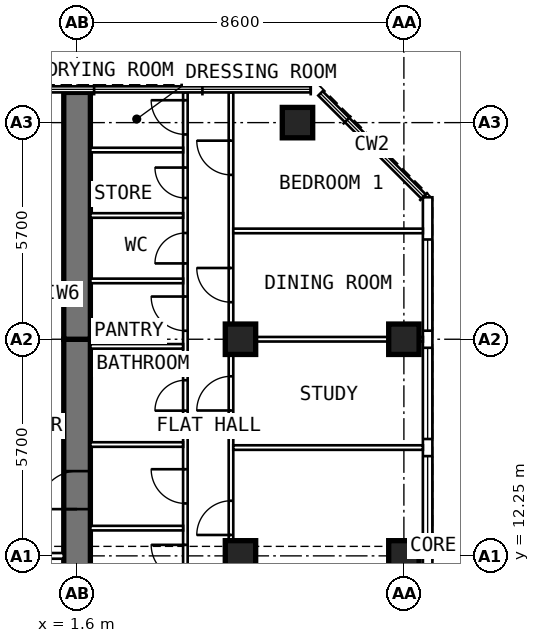
"""IFC4 building model, lengths in metres.
Left out: names, types, materials, properties, quantities, classifications, styles, units other than length and angle.
Written with IfcOpenShell. Run it as: python <this file> out.ifc"""

import sys

from ifc_helpers import new_model, si_unit, direction, frame, frame_2d, origin, origin_2d, place, context, subcontext, project, spatial, rectangle, extrude, element, fill, save


model = new_model("IFC4")
c1 = context("Model", 3, precision=1e-05, world=origin(), true_north=direction((0.0, 1.0)))
c2 = subcontext(c1, "Body", "Model", "MODEL_VIEW")
j1 = project(units=[si_unit("LENGTHUNIT", "METRE"), si_unit("PLANEANGLEUNIT", "RADIAN")], contexts=[c1])
p1 = place(None, origin())
s1 = spatial("IfcSite", under=j1, at=p1, CompositionType="ELEMENT")
p2 = place(p1, origin())
s2 = spatial("IfcBuilding", under=s1, at=p2, CompositionType="ELEMENT")
p3 = place(p2, frame((0.0, 0.0, 267.4)))
s3 = spatial("IfcBuildingStorey", under=s2, at=p3, CompositionType="ELEMENT", Elevation=267.4)
for number, where, z_axis, x_axis in (
    (1, (10.2, 12.25, 0.0), (0.0, 0.0, 1.0), (0.0, 1.0, 0.0)),
    (2, (10.2, 17.95, 0.0), (0.0, 0.0, 1.0), (0.0, 1.0, 0.0)),
    (3, (7.4, 23.65, 0.0), (0.0, 0.0, 1.0), (0.0, 1.0, 0.0)),
    (4, (5.9, 12.25, 0.0), (0.0, 0.0, 1.0), (0.0, 1.0, 0.0)),
    (5, (5.9, 17.95, 0.0), (0.0, 0.0, 1.0), (0.0, 1.0, 0.0)),
):
    element("IfcColumn", number, at=place(p3, frame(where, z_axis=z_axis, x_axis=x_axis)), inside=s3, PredefinedType="COLUMN", context=c2, shape_type="SweptSolid", body=[
        extrude(rectangle(XDim=0.8, YDim=0.8, at=origin_2d()), origin(), (0.0, 0.0, 1.0), 3.6),
    ])
p4 = place(p3, frame((1.6, 9.6, 0.0), z_axis=(0.0, 0.0, 1.0), x_axis=(0.0, 1.0, 0.0)))
e6 = element("IfcWall", 6, at=p4, inside=s3, PredefinedType="SHEAR", context=c2, shape_type="SweptSolid", body=[
    extrude(rectangle(XDim=8.35, YDim=0.7, at=frame_2d((4.175, 0.0))), origin(), (0.0, 0.0, 1.0), 3.6),
])
p5 = place(p4, frame((3.88, 0.0, 0.0)))
e7 = element("IfcOpeningElement", 7, at=p5, cuts=e6, PredefinedType="OPENING", context=c2, shape_type="SweptSolid", body=[
    extrude(rectangle(XDim=1.0, YDim=2.1, at=frame_2d((0.5, 1.05))), frame((0.0, 0.362, 0.0), z_axis=(0.0, -1.0, 0.0), x_axis=(1.0, 0.0, 0.0)), (0.0, 0.0, 1.0), 0.724),
])
p6 = place(p3, frame((1.6, 17.95, 0.0), z_axis=(0.0, 0.0, 1.0), x_axis=(0.0, 1.0, 0.0)))
e8 = element("IfcWall", 8, at=p6, inside=s3, PredefinedType="SHEAR", context=c2, shape_type="SweptSolid", body=[
    extrude(rectangle(XDim=6.495, YDim=0.7, at=frame_2d((3.248, 0.0))), origin(), (0.0, 0.0, 1.0), 3.6),
])
p7 = place(p3, frame((10.825, 6.409, 0.0), z_axis=(0.0, 0.0, 1.0), x_axis=(0.0, 1.0, 0.0)))
e9 = element("IfcWall", 9, at=p7, inside=s3, PredefinedType="SOLIDWALL", context=c2, shape_type="SweptSolid", body=[
    extrude(rectangle(XDim=15.276, YDim=0.25, at=frame_2d((7.638, 0.0))), origin(), (0.0, 0.0, 1.0), 3.35),
])
p8 = place(p7, frame((0.366, 0.0, 0.6)))
e10 = element("IfcOpeningElement", 10, at=p8, cuts=e9, PredefinedType="OPENING", context=c2, shape_type="SweptSolid", body=[
    extrude(rectangle(XDim=2.4, YDim=2.0, at=frame_2d((1.2, 1.0))), frame((0.0, 0.137, 0.0), z_axis=(0.0, -1.0, 0.0), x_axis=(1.0, 0.0, 0.0)), (0.0, 0.0, 1.0), 0.274),
])
p9 = place(p7, frame((3.216, 0.0, 0.6)))
e11 = element("IfcOpeningElement", 11, at=p9, cuts=e9, PredefinedType="OPENING", context=c2, shape_type="SweptSolid", body=[
    extrude(rectangle(XDim=2.4, YDim=2.0, at=frame_2d((1.2, 1.0))), frame((0.0, 0.137, 0.0), z_axis=(0.0, -1.0, 0.0), x_axis=(1.0, 0.0, 0.0)), (0.0, 0.0, 1.0), 0.274),
])
p10 = place(p7, frame((6.066, 0.0, 0.6)))
e12 = element("IfcOpeningElement", 12, at=p10, cuts=e9, PredefinedType="OPENING", context=c2, shape_type="SweptSolid", body=[
    extrude(rectangle(XDim=2.4, YDim=2.0, at=frame_2d((1.2, 1.0))), frame((0.0, 0.137, 0.0), z_axis=(0.0, -1.0, 0.0), x_axis=(1.0, 0.0, 0.0)), (0.0, 0.0, 1.0), 0.274),
])
p11 = place(p7, frame((8.916, 0.0, 0.6)))
e13 = element("IfcOpeningElement", 13, at=p11, cuts=e9, PredefinedType="OPENING", context=c2, shape_type="SweptSolid", body=[
    extrude(rectangle(XDim=2.4, YDim=2.0, at=frame_2d((1.2, 1.0))), frame((0.0, 0.137, 0.0), z_axis=(0.0, -1.0, 0.0), x_axis=(1.0, 0.0, 0.0)), (0.0, 0.0, 1.0), 0.274),
])
p12 = place(p7, frame((11.766, 0.0, 0.6)))
e14 = element("IfcOpeningElement", 14, at=p12, cuts=e9, PredefinedType="OPENING", context=c2, shape_type="SweptSolid", body=[
    extrude(rectangle(XDim=2.4, YDim=2.0, at=frame_2d((1.2, 1.0))), frame((0.0, 0.137, 0.0), z_axis=(0.0, -1.0, 0.0), x_axis=(1.0, 0.0, 0.0)), (0.0, 0.0, 1.0), 0.274),
])
p13 = place(p3, frame((4.45, 9.875, 0.0), z_axis=(0.0, 0.0, 1.0), x_axis=(0.0, 1.0, 0.0)))
e15 = element("IfcWall", 15, at=p13, inside=s3, PredefinedType="PARTITIONING", context=c2, shape_type="SweptSolid", body=[
    extrude(rectangle(XDim=14.57, YDim=0.12, at=frame_2d((7.285, 0.0))), origin(), (0.0, 0.0, 1.0), 3.35),
])
p14 = place(p13, frame((1.765, 0.0, 0.0)))
e16 = element("IfcOpeningElement", 16, at=p14, cuts=e15, PredefinedType="OPENING", context=c2, shape_type="SweptSolid", body=[
    extrude(rectangle(XDim=0.9, YDim=2.1, at=frame_2d((0.45, 1.05))), frame((0.0, 0.072, 0.0), z_axis=(0.0, -1.0, 0.0), x_axis=(1.0, 0.0, 0.0)), (0.0, 0.0, 1.0), 0.144),
])
p15 = place(p13, frame((3.755, 0.0, 0.0)))
e17 = element("IfcOpeningElement", 17, at=p15, cuts=e15, PredefinedType="OPENING", context=c2, shape_type="SweptSolid", body=[
    extrude(rectangle(XDim=0.9, YDim=2.1, at=frame_2d((0.45, 1.05))), frame((0.0, 0.072, 0.0), z_axis=(0.0, -1.0, 0.0), x_axis=(1.0, 0.0, 0.0)), (0.0, 0.0, 1.0), 0.144),
])
p16 = place(p13, frame((6.196, 0.0, 0.0)))
e18 = element("IfcOpeningElement", 18, at=p16, cuts=e15, PredefinedType="OPENING", context=c2, shape_type="SweptSolid", body=[
    extrude(rectangle(XDim=0.8, YDim=2.1, at=frame_2d((0.4, 1.05))), frame((0.0, 0.072, 0.0), z_axis=(0.0, -1.0, 0.0), x_axis=(1.0, 0.0, 0.0)), (0.0, 0.0, 1.0), 0.144),
])
p17 = place(p13, frame((8.299, 0.0, 0.0)))
e19 = element("IfcOpeningElement", 19, at=p17, cuts=e15, PredefinedType="OPENING", context=c2, shape_type="SweptSolid", body=[
    extrude(rectangle(XDim=0.9, YDim=2.1, at=frame_2d((0.45, 1.05))), frame((0.0, 0.072, 0.0), z_axis=(0.0, -1.0, 0.0), x_axis=(1.0, 0.0, 0.0)), (0.0, 0.0, 1.0), 0.144),
])
p18 = place(p13, frame((10.071, 0.0, 0.0)))
e20 = element("IfcOpeningElement", 20, at=p18, cuts=e15, PredefinedType="OPENING", context=c2, shape_type="SweptSolid", body=[
    extrude(rectangle(XDim=0.8, YDim=2.1, at=frame_2d((0.4, 1.05))), frame((0.0, 0.072, 0.0), z_axis=(0.0, -1.0, 0.0), x_axis=(1.0, 0.0, 0.0)), (0.0, 0.0, 1.0), 0.144),
])
p19 = place(p13, frame((11.792, 0.0, 0.0)))
e21 = element("IfcOpeningElement", 21, at=p19, cuts=e15, PredefinedType="OPENING", context=c2, shape_type="SweptSolid", body=[
    extrude(rectangle(XDim=0.8, YDim=2.1, at=frame_2d((0.4, 1.05))), frame((0.0, 0.072, 0.0), z_axis=(0.0, -1.0, 0.0), x_axis=(1.0, 0.0, 0.0)), (0.0, 0.0, 1.0), 0.144),
])
p20 = place(p13, frame((13.464, 0.0, 0.0)))
e22 = element("IfcOpeningElement", 22, at=p20, cuts=e15, PredefinedType="OPENING", context=c2, shape_type="SweptSolid", body=[
    extrude(rectangle(XDim=0.9, YDim=2.1, at=frame_2d((0.45, 1.05))), frame((0.0, 0.072, 0.0), z_axis=(0.0, -1.0, 0.0), x_axis=(1.0, 0.0, 0.0)), (0.0, 0.0, 1.0), 0.144),
])
p21 = place(p3, frame((5.65, 9.6, 0.0), z_axis=(0.0, 0.0, 1.0), x_axis=(0.0, 1.0, 0.0)))
e23 = element("IfcWall", 23, at=p21, inside=s3, PredefinedType="PARTITIONING", context=c2, shape_type="SweptSolid", body=[
    extrude(rectangle(XDim=14.845, YDim=0.12, at=frame_2d((7.422, 0.0))), origin(), (0.0, 0.0, 1.0), 3.35),
])
p22 = place(p21, frame((3.2, 0.0, 0.0)))
e24 = element("IfcOpeningElement", 24, at=p22, cuts=e23, PredefinedType="OPENING", context=c2, shape_type="SweptSolid", body=[
    extrude(rectangle(XDim=0.9, YDim=2.1, at=frame_2d((0.45, 1.05))), frame((0.0, 0.072, 0.0), z_axis=(0.0, -1.0, 0.0), x_axis=(1.0, 0.0, 0.0)), (0.0, 0.0, 1.0), 0.144),
])
p23 = place(p21, frame((6.475, 0.0, 0.0)))
e25 = element("IfcOpeningElement", 25, at=p23, cuts=e23, PredefinedType="OPENING", context=c2, shape_type="SweptSolid", body=[
    extrude(rectangle(XDim=0.9, YDim=2.1, at=frame_2d((0.45, 1.05))), frame((0.0, 0.072, 0.0), z_axis=(0.0, -1.0, 0.0), x_axis=(1.0, 0.0, 0.0)), (0.0, 0.0, 1.0), 0.144),
])
p24 = place(p21, frame((9.325, 0.0, 0.0)))
e26 = element("IfcOpeningElement", 26, at=p24, cuts=e23, PredefinedType="OPENING", context=c2, shape_type="SweptSolid", body=[
    extrude(rectangle(XDim=0.9, YDim=2.1, at=frame_2d((0.45, 1.05))), frame((0.0, 0.072, 0.0), z_axis=(0.0, -1.0, 0.0), x_axis=(1.0, 0.0, 0.0)), (0.0, 0.0, 1.0), 0.144),
])
p25 = place(p21, frame((12.675, 0.0, 0.0)))
e27 = element("IfcOpeningElement", 27, at=p25, cuts=e23, PredefinedType="OPENING", context=c2, shape_type="SweptSolid", body=[
    extrude(rectangle(XDim=0.9, YDim=2.1, at=frame_2d((0.45, 1.05))), frame((0.0, 0.072, 0.0), z_axis=(0.0, -1.0, 0.0), x_axis=(1.0, 0.0, 0.0)), (0.0, 0.0, 1.0), 0.144),
])
p26 = place(p3, frame((5.71, 15.1, 0.0), z_axis=(0.0, 0.0, 1.0), x_axis=(1.0, 0.0, 0.0)))
e28 = element("IfcWall", 28, at=p26, inside=s3, PredefinedType="PARTITIONING", context=c2, shape_type="SweptSolid", body=[
    extrude(rectangle(XDim=4.99, YDim=0.12, at=frame_2d((2.495, 0.0))), origin(), (0.0, 0.0, 1.0), 3.35),
])
p27 = place(p3, frame((5.71, 17.95, 0.0), z_axis=(0.0, 0.0, 1.0), x_axis=(1.0, 0.0, 0.0)))
e29 = element("IfcWall", 29, at=p27, inside=s3, PredefinedType="PARTITIONING", context=c2, shape_type="SweptSolid", body=[
    extrude(rectangle(XDim=4.99, YDim=0.12, at=frame_2d((2.495, 0.0))), origin(), (0.0, 0.0, 1.0), 2.45),
])
p28 = place(p3, frame((5.71, 20.8, 0.0), z_axis=(0.0, 0.0, 1.0), x_axis=(1.0, 0.0, 0.0)))
e30 = element("IfcWall", 30, at=p28, inside=s3, PredefinedType="PARTITIONING", context=c2, shape_type="SweptSolid", body=[
    extrude(rectangle(XDim=4.99, YDim=0.12, at=frame_2d((2.495, 0.0))), origin(), (0.0, 0.0, 1.0), 3.35),
])
for number, where, z_axis, x_axis in (
    (31, (1.95, 12.98, 0.0), (0.0, 0.0, 1.0), (1.0, 0.0, 0.0)),
    (32, (1.95, 15.18, 0.0), (0.0, 0.0, 1.0), (1.0, 0.0, 0.0)),
):
    element("IfcWall", number, at=place(p3, frame(where, z_axis=z_axis, x_axis=x_axis)), inside=s3, PredefinedType="PARTITIONING", context=c2, shape_type="SweptSolid", body=[
        extrude(rectangle(XDim=2.44, YDim=0.12, at=frame_2d((1.22, 0.0))), origin(), (0.0, 0.0, 1.0), 3.35),
    ])
p29 = place(p3, frame((1.95, 17.763, 0.0), z_axis=(0.0, 0.0, 1.0), x_axis=(1.0, 0.0, 0.0)))
e33 = element("IfcWall", 33, at=p29, inside=s3, PredefinedType="PARTITIONING", context=c2, shape_type="SweptSolid", body=[
    extrude(rectangle(XDim=2.44, YDim=0.12, at=frame_2d((1.22, 0.0))), origin(), (0.0, 0.0, 1.0), 2.45),
])
for number, where, z_axis, x_axis in (
    (34, (1.95, 19.485, 0.0), (0.0, 0.0, 1.0), (1.0, 0.0, 0.0)),
    (35, (1.95, 21.206, 0.0), (0.0, 0.0, 1.0), (1.0, 0.0, 0.0)),
    (36, (1.95, 22.928, 0.0), (0.0, 0.0, 1.0), (1.0, 0.0, 0.0)),
):
    element("IfcWall", number, at=place(p3, frame(where, z_axis=z_axis, x_axis=x_axis)), inside=s3, PredefinedType="PARTITIONING", context=c2, shape_type="SweptSolid", body=[
        extrude(rectangle(XDim=2.44, YDim=0.12, at=frame_2d((1.22, 0.0))), origin(), (0.0, 0.0, 1.0), 3.35),
    ])
p30 = place(p3, frame((1.25, 19.15, 0.0), z_axis=(0.0, 0.0, 1.0), x_axis=(-1.0, 0.0, 0.0)))
e37 = element("IfcWall", 37, at=p30, inside=s3, PredefinedType="PARTITIONING", context=c2, shape_type="SweptSolid", body=[
    extrude(rectangle(XDim=2.5, YDim=0.15, at=frame_2d((1.25, 0.0))), origin(), (0.0, 0.0, 1.0), 3.35),
])
p31 = place(p30, frame((0.75, 0.0, 0.0)))
e38 = element("IfcOpeningElement", 38, at=p31, cuts=e37, PredefinedType="OPENING", context=c2, shape_type="SweptSolid", body=[
    extrude(rectangle(XDim=1.0, YDim=2.1, at=frame_2d((0.5, 1.05))), frame((0.0, 0.087, 0.0), z_axis=(0.0, -1.0, 0.0), x_axis=(1.0, 0.0, 0.0)), (0.0, 0.0, 1.0), 0.174),
])
p32 = place(p3, frame((1.25, 12.25, 0.0), z_axis=(0.0, 0.0, 1.0), x_axis=(-1.0, 0.0, 0.0)))
e39 = element("IfcWall", 39, at=p32, inside=s3, PredefinedType="PARTITIONING", context=c2, shape_type="SweptSolid", body=[
    extrude(rectangle(XDim=2.5, YDim=0.15, at=frame_2d((1.25, 0.0))), origin(), (0.0, 0.0, 1.0), 3.35),
])
p33 = place(p32, frame((0.75, 0.0, 0.0)))
e40 = element("IfcOpeningElement", 40, at=p33, cuts=e39, PredefinedType="OPENING", context=c2, shape_type="SweptSolid", body=[
    extrude(rectangle(XDim=1.0, YDim=2.1, at=frame_2d((0.5, 1.05))), frame((0.0, 0.087, 0.0), z_axis=(0.0, -1.0, 0.0), x_axis=(1.0, 0.0, 0.0)), (0.0, 0.0, 1.0), 0.174),
])
p34 = place(p10, origin())
e41 = element("IfcWindow", 41, at=p34, inside=s3, PartitioningType="SINGLE_PANEL", PredefinedType="WINDOW", context=c2, shape_type="SweptSolid", body=[
    extrude(rectangle(XDim=2.4, YDim=2.0, at=frame_2d((1.2, 1.0))), frame((0.0, 0.03, 0.0), z_axis=(0.0, -1.0, 0.0), x_axis=(1.0, 0.0, 0.0)), (0.0, 0.0, 1.0), 0.06),
])
fill(e12, e41)
p35 = place(p11, origin())
e42 = element("IfcWindow", 42, at=p35, inside=s3, PartitioningType="SINGLE_PANEL", PredefinedType="WINDOW", context=c2, shape_type="SweptSolid", body=[
    extrude(rectangle(XDim=2.4, YDim=2.0, at=frame_2d((1.2, 1.0))), frame((0.0, 0.03, 0.0), z_axis=(0.0, -1.0, 0.0), x_axis=(1.0, 0.0, 0.0)), (0.0, 0.0, 1.0), 0.06),
])
fill(e13, e42)
p36 = place(p12, origin())
e43 = element("IfcWindow", 43, at=p36, inside=s3, PartitioningType="SINGLE_PANEL", PredefinedType="WINDOW", context=c2, shape_type="SweptSolid", body=[
    extrude(rectangle(XDim=2.4, YDim=2.0, at=frame_2d((1.2, 1.0))), frame((0.0, 0.03, 0.0), z_axis=(0.0, -1.0, 0.0), x_axis=(1.0, 0.0, 0.0)), (0.0, 0.0, 1.0), 0.06),
])
fill(e14, e43)
p37 = place(p5, origin())
e44 = element("IfcDoor", 44, at=p37, inside=s3, OperationType="SINGLE_SWING_LEFT", PredefinedType="DOOR", context=c2, shape_type="SweptSolid", body=[
    extrude(rectangle(XDim=1.0, YDim=2.1, at=frame_2d((0.5, 1.05))), frame((0.0, 0.1, 0.0), z_axis=(0.0, -1.0, 0.0), x_axis=(1.0, 0.0, 0.0)), (0.0, 0.0, 1.0), 0.2),
])
fill(e7, e44)
p38 = place(p22, origin())
e45 = element("IfcDoor", 45, at=p38, inside=s3, OperationType="SINGLE_SWING_LEFT", PredefinedType="DOOR", context=c2, shape_type="SweptSolid", body=[
    extrude(rectangle(XDim=0.9, YDim=2.1, at=frame_2d((0.45, 1.05))), frame((0.0, 0.025, 0.0), z_axis=(0.0, -1.0, 0.0), x_axis=(1.0, 0.0, 0.0)), (0.0, 0.0, 1.0), 0.05),
])
fill(e24, e45)
p39 = place(p23, origin())
e46 = element("IfcDoor", 46, at=p39, inside=s3, OperationType="SINGLE_SWING_LEFT", PredefinedType="DOOR", context=c2, shape_type="SweptSolid", body=[
    extrude(rectangle(XDim=0.9, YDim=2.1, at=frame_2d((0.45, 1.05))), frame((0.0, 0.025, 0.0), z_axis=(0.0, -1.0, 0.0), x_axis=(1.0, 0.0, 0.0)), (0.0, 0.0, 1.0), 0.05),
])
fill(e25, e46)
p40 = place(p24, origin())
e47 = element("IfcDoor", 47, at=p40, inside=s3, OperationType="SINGLE_SWING_RIGHT", PredefinedType="DOOR", context=c2, shape_type="SweptSolid", body=[
    extrude(rectangle(XDim=0.9, YDim=2.1, at=frame_2d((0.45, 1.05))), frame((0.0, 0.025, 0.0), z_axis=(0.0, -1.0, 0.0), x_axis=(1.0, 0.0, 0.0)), (0.0, 0.0, 1.0), 0.05),
])
fill(e26, e47)
p41 = place(p25, origin())
e48 = element("IfcDoor", 48, at=p41, inside=s3, OperationType="SINGLE_SWING_RIGHT", PredefinedType="DOOR", context=c2, shape_type="SweptSolid", body=[
    extrude(rectangle(XDim=0.9, YDim=2.1, at=frame_2d((0.45, 1.05))), frame((0.0, 0.025, 0.0), z_axis=(0.0, -1.0, 0.0), x_axis=(1.0, 0.0, 0.0)), (0.0, 0.0, 1.0), 0.05),
])
fill(e27, e48)
p42 = place(p14, origin())
e49 = element("IfcDoor", 49, at=p42, inside=s3, OperationType="SINGLE_SWING_RIGHT", PredefinedType="DOOR", context=c2, shape_type="SweptSolid", body=[
    extrude(rectangle(XDim=0.9, YDim=2.1, at=frame_2d((0.45, 1.05))), frame((0.0, 0.025, 0.0), z_axis=(0.0, -1.0, 0.0), x_axis=(1.0, 0.0, 0.0)), (0.0, 0.0, 1.0), 0.05),
])
fill(e16, e49)
p43 = place(p15, origin())
e50 = element("IfcDoor", 50, at=p43, inside=s3, OperationType="SINGLE_SWING_RIGHT", PredefinedType="DOOR", context=c2, shape_type="SweptSolid", body=[
    extrude(rectangle(XDim=0.9, YDim=2.1, at=frame_2d((0.45, 1.05))), frame((0.0, 0.025, 0.0), z_axis=(0.0, -1.0, 0.0), x_axis=(1.0, 0.0, 0.0)), (0.0, 0.0, 1.0), 0.05),
])
fill(e17, e50)
p44 = place(p16, origin())
e51 = element("IfcDoor", 51, at=p44, inside=s3, OperationType="SINGLE_SWING_LEFT", PredefinedType="DOOR", context=c2, shape_type="SweptSolid", body=[
    extrude(rectangle(XDim=0.8, YDim=2.1, at=frame_2d((0.4, 1.05))), frame((0.0, 0.025, 0.0), z_axis=(0.0, -1.0, 0.0), x_axis=(1.0, 0.0, 0.0)), (0.0, 0.0, 1.0), 0.05),
])
fill(e18, e51)
p45 = place(p17, origin())
e52 = element("IfcDoor", 52, at=p45, inside=s3, OperationType="SINGLE_SWING_RIGHT", PredefinedType="DOOR", context=c2, shape_type="SweptSolid", body=[
    extrude(rectangle(XDim=0.9, YDim=2.1, at=frame_2d((0.45, 1.05))), frame((0.0, 0.025, 0.0), z_axis=(0.0, -1.0, 0.0), x_axis=(1.0, 0.0, 0.0)), (0.0, 0.0, 1.0), 0.05),
])
fill(e19, e52)
p46 = place(p18, origin())
e53 = element("IfcDoor", 53, at=p46, inside=s3, OperationType="SINGLE_SWING_LEFT", PredefinedType="DOOR", context=c2, shape_type="SweptSolid", body=[
    extrude(rectangle(XDim=0.8, YDim=2.1, at=frame_2d((0.4, 1.05))), frame((0.0, 0.025, 0.0), z_axis=(0.0, -1.0, 0.0), x_axis=(1.0, 0.0, 0.0)), (0.0, 0.0, 1.0), 0.05),
])
fill(e20, e53)
p47 = place(p19, origin())
e54 = element("IfcDoor", 54, at=p47, inside=s3, OperationType="SINGLE_SWING_RIGHT", PredefinedType="DOOR", context=c2, shape_type="SweptSolid", body=[
    extrude(rectangle(XDim=0.8, YDim=2.1, at=frame_2d((0.4, 1.05))), frame((0.0, 0.025, 0.0), z_axis=(0.0, -1.0, 0.0), x_axis=(1.0, 0.0, 0.0)), (0.0, 0.0, 1.0), 0.05),
])
fill(e21, e54)
p48 = place(p20, origin())
e55 = element("IfcDoor", 55, at=p48, inside=s3, OperationType="SINGLE_SWING_RIGHT", PredefinedType="DOOR", context=c2, shape_type="SweptSolid", body=[
    extrude(rectangle(XDim=0.9, YDim=2.1, at=frame_2d((0.45, 1.05))), frame((0.0, 0.025, 0.0), z_axis=(0.0, -1.0, 0.0), x_axis=(1.0, 0.0, 0.0)), (0.0, 0.0, 1.0), 0.05),
])
fill(e22, e55)
save(model, sys.argv[1])
